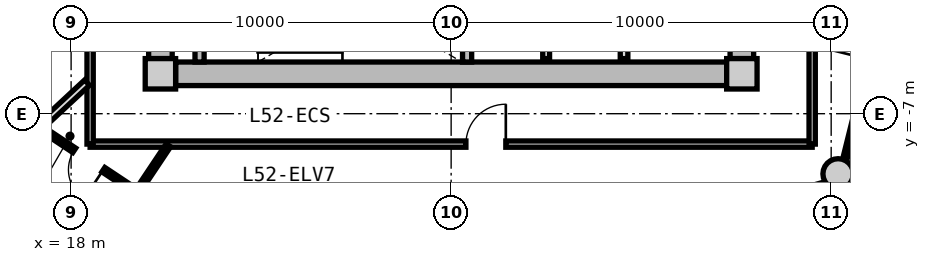
"""IFC4 building model, lengths in metres.
Left out: names, types, materials, properties, quantities, classifications, styles, units other than length and angle.
Written with IfcOpenShell. Run it as: python <this file> out.ifc"""

import sys

from ifc_helpers import new_model, si_unit, direction, frame, frame_2d, origin, origin_2d, place, context, subcontext, project, spatial, rectangle, circle, extrude, source, transform, mapped, element, fill, save


model = new_model("IFC4")
c1 = context("Model", 3, precision=1e-05, world=origin(), true_north=direction((0.0, 1.0)))
c2 = subcontext(c1, "Body", "Model", "MODEL_VIEW")
j1 = project(units=[si_unit("LENGTHUNIT", "METRE"), si_unit("PLANEANGLEUNIT", "RADIAN")], contexts=[c1])
p1 = place(None, origin())
s1 = spatial("IfcSite", under=j1, at=p1, CompositionType="ELEMENT")
p2 = place(p1, origin())
s2 = spatial("IfcBuilding", under=s1, at=p2, CompositionType="ELEMENT")
p3 = place(p2, frame((0.0, 0.0, 167.85)))
s3 = spatial("IfcBuildingStorey", under=s2, at=p3, CompositionType="ELEMENT", Elevation=167.85)
m1 = source(origin(), c2, "Body", "SweptSolid", [
    extrude(rectangle(XDim=0.8, YDim=0.8, at=origin_2d()), origin(), (0.0, 0.0, 1.0), 3.05),
])
for number, where, z_axis, x_axis in (
    (1, (20.35, -5.95, 0.0), (0.0, 0.0, 1.0), (1.0, 0.0, 0.0)),
    (2, (35.65, -5.95, 0.0), (0.0, 0.0, 1.0), (1.0, 0.0, 0.0)),
):
    element("IfcColumn", number, at=place(p3, frame(where, z_axis=z_axis, x_axis=x_axis)), inside=s3, PredefinedType="COLUMN", context=c2, shape_type="MappedRepresentation", body=[
        mapped(m1, transform((0.0, 0.0, 0.0), x_axis=(1.0, 0.0, 0.0), y_axis=(0.0, 1.0, 0.0), z_axis=(0.0, 0.0, 1.0), scale=1.0)),
    ])
m2 = source(origin(), c2, "Body", "SweptSolid", [
    extrude(rectangle(XDim=14.5, YDim=0.62, at=frame_2d((7.25, 0.0))), origin(), (0.0, 0.0, 1.0), 2.81),
])
p4 = place(p3, frame((35.25, -5.95, 0.0), z_axis=(0.0, 0.0, 1.0), x_axis=(-1.0, 0.0, 0.0)))
e3 = element("IfcWall", 3, at=p4, inside=s3, PredefinedType="SHEAR", context=c2, shape_type="MappedRepresentation", body=[
    mapped(m2, transform((0.0, 0.0, 0.0), x_axis=(1.0, 0.0, 0.0), y_axis=(0.0, 1.0, 0.0), z_axis=(0.0, 0.0, 1.0), scale=1.0)),
])
m3 = source(origin(), c2, "Body", "SweptSolid", [
    extrude(rectangle(XDim=11.1, YDim=0.62, at=frame_2d((5.55, 0.0))), origin(), (0.0, 0.0, 1.0), 2.81),
])
p5 = place(p3, frame((20.35, -5.55, 0.0), z_axis=(0.0, 0.0, 1.0), x_axis=(0.0, 1.0, 0.0)))
e4 = element("IfcWall", 4, at=p5, inside=s3, PredefinedType="SHEAR", context=c2, shape_type="MappedRepresentation", body=[
    mapped(m3, transform((0.0, 0.0, 0.0), x_axis=(1.0, 0.0, 0.0), y_axis=(0.0, 1.0, 0.0), z_axis=(0.0, 0.0, 1.0), scale=1.0)),
])
p6 = place(p5, frame((3.8, 0.0, 0.0)))
e5 = element("IfcOpeningElement", 5, at=p6, cuts=e4, PredefinedType="OPENING", context=c2, shape_type="SweptSolid", body=[
    extrude(rectangle(XDim=1.2, YDim=2.15, at=frame_2d((0.6, 1.075))), frame((0.0, 0.32, 0.0), z_axis=(0.0, -1.0, 0.0), x_axis=(1.0, 0.0, 0.0)), (0.0, 0.0, 1.0), 0.64),
])
p7 = place(p3, frame((35.65, 5.55, 0.0), z_axis=(0.0, 0.0, 1.0), x_axis=(0.0, -1.0, 0.0)))
e6 = element("IfcWall", 6, at=p7, inside=s3, PredefinedType="SHEAR", context=c2, shape_type="MappedRepresentation", body=[
    mapped(m3, transform((0.0, 0.0, 0.0), x_axis=(1.0, 0.0, 0.0), y_axis=(0.0, 1.0, 0.0), z_axis=(0.0, 0.0, 1.0), scale=1.0)),
])
p8 = place(p7, frame((5.65, 0.0, 0.0)))
e7 = element("IfcOpeningElement", 7, at=p8, cuts=e6, PredefinedType="OPENING", context=c2, shape_type="SweptSolid", body=[
    extrude(rectangle(XDim=1.2, YDim=2.15, at=frame_2d((0.6, 1.075))), frame((0.0, 0.32, 0.0), z_axis=(0.0, -1.0, 0.0), x_axis=(1.0, 0.0, 0.0)), (0.0, 0.0, 1.0), 0.64),
])
p9 = place(p7, frame((9.3, 0.0, 0.0)))
e8 = element("IfcOpeningElement", 8, at=p9, cuts=e6, PredefinedType="OPENING", context=c2, shape_type="SweptSolid", body=[
    extrude(rectangle(XDim=1.0, YDim=2.1, at=frame_2d((0.5, 1.05))), frame((0.0, 0.32, 0.0), z_axis=(0.0, -1.0, 0.0), x_axis=(1.0, 0.0, 0.0)), (0.0, 0.0, 1.0), 0.64),
])
m4 = source(origin(), c2, "Body", "SweptSolid", [
    extrude(circle(Radius=0.4, at=origin_2d()), origin(), (0.0, 0.0, 1.0), 3.05),
])
p10 = place(p3, frame((38.183, -8.584, 0.0), z_axis=(0.0, 0.0, 1.0), x_axis=(1.0, 0.0, 0.0)))
e9 = element("IfcColumn", 9, at=p10, inside=s3, PredefinedType="COLUMN", context=c2, shape_type="MappedRepresentation", body=[
    mapped(m4, transform((0.0, 0.0, 0.0), x_axis=(1.0, 0.0, 0.0), y_axis=(0.0, 1.0, 0.0), z_axis=(0.0, 0.0, 1.0), scale=1.0)),
])
m5 = source(origin(), c2, "Body", "SweptSolid", [
    extrude(rectangle(XDim=3.19, YDim=0.24, at=frame_2d((1.595, 0.0))), origin(), (0.0, 0.0, 1.0), 2.81),
])
for number, where, z_axis, x_axis in (
    (10, (21.38, -5.64, 0.0), (0.0, 0.0, 1.0), (0.0, 1.0, 0.0)),
    (11, (28.42, -5.64, 0.0), (0.0, 0.0, 1.0), (0.0, 1.0, 0.0)),
):
    element("IfcWall", number, at=place(p3, frame(where, z_axis=z_axis, x_axis=x_axis)), inside=s3, PredefinedType="PARTITIONING", context=c2, shape_type="MappedRepresentation", body=[
        mapped(m5, transform((0.0, 0.0, 0.0), x_axis=(1.0, 0.0, 0.0), y_axis=(0.0, 1.0, 0.0), z_axis=(0.0, 0.0, 1.0), scale=1.0)),
    ])
m6 = source(origin(), c2, "Body", "SweptSolid", [
    extrude(rectangle(XDim=3.8, YDim=0.2, at=frame_2d((1.9, 0.0))), origin(), (0.0, 0.0, 1.0), 2.795),
])
p11 = place(p3, frame((32.55, -5.55, 0.0), z_axis=(0.0, 0.0, 1.0), x_axis=(0.0, 1.0, 0.0)))
e12 = element("IfcWall", 12, at=p11, inside=s3, PredefinedType="PARTITIONING", context=c2, shape_type="MappedRepresentation", body=[
    mapped(m6, transform((0.0, 0.0, 0.0), x_axis=(1.0, 0.0, 0.0), y_axis=(0.0, 1.0, 0.0), z_axis=(0.0, 0.0, 1.0), scale=1.0)),
])
m7 = source(origin(), c2, "Body", "SweptSolid", [
    extrude(rectangle(XDim=4.2, YDim=0.18, at=frame_2d((2.1, 0.0))), origin(), (0.0, 0.0, 1.0), 2.795),
])
p12 = place(p3, frame((30.5, -5.55, 0.0), z_axis=(0.0, 0.0, 1.0), x_axis=(0.0, 1.0, 0.0)))
e13 = element("IfcWall", 13, at=p12, inside=s3, PredefinedType="PARTITIONING", context=c2, shape_type="MappedRepresentation", body=[
    mapped(m7, transform((0.0, 0.0, 0.0), x_axis=(1.0, 0.0, 0.0), y_axis=(0.0, 1.0, 0.0), z_axis=(0.0, 0.0, 1.0), scale=1.0)),
])
m8 = source(origin(), c2, "Body", "SweptSolid", [
    extrude(rectangle(XDim=19.0, YDim=0.165, at=frame_2d((9.5, 0.0))), origin(), (0.0, 0.0, 1.0), 2.795),
])
p13 = place(p3, frame((37.5, -7.8, 0.0), z_axis=(0.0, 0.0, 1.0), x_axis=(-1.0, 0.0, 0.0)))
e14 = element("IfcWall", 14, at=p13, inside=s3, PredefinedType="PARTITIONING", context=c2, shape_type="MappedRepresentation", body=[
    mapped(m8, transform((0.0, 0.0, 0.0), x_axis=(1.0, 0.0, 0.0), y_axis=(0.0, 1.0, 0.0), z_axis=(0.0, 0.0, 1.0), scale=1.0)),
])
p14 = place(p13, frame((8.061, 0.0, 0.0)))
e15 = element("IfcOpeningElement", 15, at=p14, cuts=e14, PredefinedType="OPENING", context=c2, shape_type="SweptSolid", body=[
    extrude(rectangle(XDim=1.05, YDim=2.15, at=frame_2d((0.525, 1.075))), frame((0.0, 0.093, 0.0), z_axis=(0.0, -1.0, 0.0), x_axis=(1.0, 0.0, 0.0)), (0.0, 0.0, 1.0), 0.185),
])
m9 = source(origin(), c2, "Body", "SweptSolid", [
    extrude(rectangle(XDim=7.365, YDim=0.165, at=frame_2d((3.682, 0.0))), origin(), (0.0, 0.0, 1.0), 2.795),
])
p15 = place(p3, frame((18.5, -7.8, 0.0), z_axis=(0.0, 0.0, 1.0), x_axis=(0.0, 1.0, 0.0)))
e16 = element("IfcWall", 16, at=p15, inside=s3, PredefinedType="PARTITIONING", context=c2, shape_type="MappedRepresentation", body=[
    mapped(m9, transform((0.0, 0.0, 0.0), x_axis=(1.0, 0.0, 0.0), y_axis=(0.0, 1.0, 0.0), z_axis=(0.0, 0.0, 1.0), scale=1.0)),
])
p16 = place(p15, frame((2.854, 0.0, 0.0)))
e17 = element("IfcOpeningElement", 17, at=p16, cuts=e16, PredefinedType="OPENING", context=c2, shape_type="SweptSolid", body=[
    extrude(rectangle(XDim=1.05, YDim=2.15, at=frame_2d((0.525, 1.075))), frame((0.0, 0.093, 0.0), z_axis=(0.0, -1.0, 0.0), x_axis=(1.0, 0.0, 0.0)), (0.0, 0.0, 1.0), 0.185),
])
m10 = source(origin(), c2, "Body", "SweptSolid", [
    extrude(rectangle(XDim=6.88, YDim=0.165, at=frame_2d((3.44, 0.0))), origin(), (0.0, 0.0, 1.0), 2.795),
])
p17 = place(p3, frame((37.5, -0.92, 0.0), z_axis=(0.0, 0.0, 1.0), x_axis=(0.0, -1.0, 0.0)))
e18 = element("IfcWall", 18, at=p17, inside=s3, PredefinedType="PARTITIONING", context=c2, shape_type="MappedRepresentation", body=[
    mapped(m10, transform((0.0, 0.0, 0.0), x_axis=(1.0, 0.0, 0.0), y_axis=(0.0, 1.0, 0.0), z_axis=(0.0, 0.0, 1.0), scale=1.0)),
])
m11 = source(origin(), c2, "Body", "SweptSolid", [
    extrude(rectangle(XDim=4.927, YDim=0.19, at=frame_2d((2.463, 0.0))), origin(), (0.0, 0.0, 1.0), 2.345),
])
p18 = place(p3, frame((18.42, -6.183, 0.0), z_axis=(0.0, 0.0, 1.0), x_axis=(-0.732191335987, -0.681098999783, 0.0)))
e19 = element("IfcWall", 19, at=p18, inside=s3, PredefinedType="PARTITIONING", context=c2, shape_type="MappedRepresentation", body=[
    mapped(m11, transform((0.0, 0.0, 0.0), x_axis=(1.0, 0.0, 0.0), y_axis=(0.0, 1.0, 0.0), z_axis=(0.0, 0.0, 1.0), scale=1.0)),
])
m12 = source(origin(), c2, "Body", "SweptSolid", [
    extrude(rectangle(XDim=7.911, YDim=0.115, at=frame_2d((3.955, 0.0))), origin(), (0.0, 0.0, 1.0), 2.345),
])
p19 = place(p3, frame((30.613, -10.927, 0.0), z_axis=(0.0, 0.0, 1.0), x_axis=(0.961104741235, 0.276184134908, 0.0)))
e20 = element("IfcWall", 20, at=p19, inside=s3, PredefinedType="PARTITIONING", context=c2, shape_type="MappedRepresentation", body=[
    mapped(m12, transform((0.0, 0.0, 0.0), x_axis=(1.0, 0.0, 0.0), y_axis=(0.0, 1.0, 0.0), z_axis=(0.0, 0.0, 1.0), scale=1.0)),
])
p20 = place(p19, frame((3.48, 0.0, 0.0)))
e21 = element("IfcOpeningElement", 21, at=p20, cuts=e20, PredefinedType="OPENING", context=c2, shape_type="SweptSolid", body=[
    extrude(rectangle(XDim=0.95, YDim=2.1, at=frame_2d((0.475, 1.05))), frame((0.0, 0.067, 0.0), z_axis=(0.0, -1.0, 0.0), x_axis=(1.0, 0.0, 0.0)), (0.0, 0.0, 1.0), 0.135),
])
m13 = source(origin(), c2, "Body", "SweptSolid", [
    extrude(rectangle(XDim=7.492, YDim=0.115, at=frame_2d((3.746, 0.0))), origin(), (0.0, 0.0, 1.0), 2.345),
])
p21 = place(p3, frame((38.223, -8.749, 0.0), z_axis=(0.0, 0.0, 1.0), x_axis=(0.24104782819, 0.970513237686, 0.0)))
e22 = element("IfcWall", 22, at=p21, inside=s3, PredefinedType="PARTITIONING", context=c2, shape_type="MappedRepresentation", body=[
    mapped(m13, transform((0.0, 0.0, 0.0), x_axis=(1.0, 0.0, 0.0), y_axis=(0.0, 1.0, 0.0), z_axis=(0.0, 0.0, 1.0), scale=1.0)),
])
p22 = place(p21, frame((3.271, 0.0, 0.0)))
e23 = element("IfcOpeningElement", 23, at=p22, cuts=e22, PredefinedType="OPENING", context=c2, shape_type="SweptSolid", body=[
    extrude(rectangle(XDim=0.95, YDim=2.1, at=frame_2d((0.475, 1.05))), frame((0.0, 0.067, 0.0), z_axis=(0.0, -1.0, 0.0), x_axis=(1.0, 0.0, 0.0)), (0.0, 0.0, 1.0), 0.135),
])
m14 = source(origin(), c2, "Body", "SweptSolid", [
    extrude(rectangle(XDim=1.208, YDim=0.115, at=frame_2d((0.604, 0.0))), origin(), (0.0, 0.0, 1.0), 2.795),
])
p23 = place(p3, frame((38.223, -8.749, 0.0), z_axis=(0.0, 0.0, 1.0), x_axis=(0.75668207681, -0.653783018008, 0.0)))
e24 = element("IfcWall", 24, at=p23, inside=s3, PredefinedType="PARTITIONING", context=c2, shape_type="MappedRepresentation", body=[
    mapped(m14, transform((0.0, 0.0, 0.0), x_axis=(1.0, 0.0, 0.0), y_axis=(0.0, 1.0, 0.0), z_axis=(0.0, 0.0, 1.0), scale=1.0)),
])
m15 = source(origin(), c2, "Body", "SweptSolid", [
    extrude(rectangle(XDim=1.482, YDim=0.14, at=frame_2d((0.741, 0.0))), origin(), (0.0, 0.0, 1.0), 2.795),
])
p24 = place(p3, frame((20.56, -7.83, 0.0), z_axis=(0.0, 0.0, 1.0), x_axis=(-0.555308105158, -0.831644700786, 0.0)))
e25 = element("IfcWall", 25, at=p24, inside=s3, PredefinedType="PARTITIONING", context=c2, shape_type="MappedRepresentation", body=[
    mapped(m15, transform((0.0, 0.0, 0.0), x_axis=(1.0, 0.0, 0.0), y_axis=(0.0, 1.0, 0.0), z_axis=(0.0, 0.0, 1.0), scale=1.0)),
])
m16 = source(origin(), c2, "Body", "SweptSolid", [
    extrude(rectangle(XDim=3.051, YDim=0.14, at=frame_2d((1.525, 0.0))), origin(), (0.0, 0.0, 1.0), 2.795),
])
p25 = place(p3, frame((19.737, -9.063, 0.0), z_axis=(0.0, 0.0, 1.0), x_axis=(-0.832763694299, 0.553628602456, 0.0)))
e26 = element("IfcWall", 26, at=p25, inside=s3, PredefinedType="PARTITIONING", context=c2, shape_type="MappedRepresentation", body=[
    mapped(m16, transform((0.0, 0.0, 0.0), x_axis=(1.0, 0.0, 0.0), y_axis=(0.0, 1.0, 0.0), z_axis=(0.0, 0.0, 1.0), scale=1.0)),
])
p26 = place(p25, frame((1.065, 0.0, 0.0)))
e27 = element("IfcOpeningElement", 27, at=p26, cuts=e26, PredefinedType="OPENING", context=c2, shape_type="SweptSolid", body=[
    extrude(rectangle(XDim=0.92, YDim=2.1, at=frame_2d((0.46, 1.05))), frame((0.0, 0.08, 0.0), z_axis=(0.0, -1.0, 0.0), x_axis=(1.0, 0.0, 0.0)), (0.0, 0.0, 1.0), 0.16),
])
m17 = source(origin(), c2, "Body", "SweptSolid", [
    extrude(rectangle(XDim=1.05, YDim=2.15, at=frame_2d((0.525, 1.075))), frame((0.0, 0.025, 0.0), z_axis=(0.0, -1.0, 0.0), x_axis=(1.0, 0.0, 0.0)), (0.0, 0.0, 1.0), 0.05),
])
p27 = place(p14, frame((1.05, 0.0, 0.0), z_axis=(0.0, 0.0, 1.0), x_axis=(-1.0, 0.0, 0.0)))
e28 = element("IfcDoor", 28, at=p27, inside=s3, OperationType="SINGLE_SWING_RIGHT", PredefinedType="DOOR", context=c2, shape_type="MappedRepresentation", body=[
    mapped(m17, transform((0.0, 0.0, 0.0), x_axis=(1.0, 0.0, 0.0), y_axis=(0.0, 1.0, 0.0), z_axis=(0.0, 0.0, 1.0), scale=1.0)),
])
fill(e15, e28)
m18 = source(origin(), c2, "Body", "SweptSolid", [
    extrude(rectangle(XDim=0.92, YDim=2.1, at=frame_2d((0.46, 1.05))), frame((0.0, 0.025, 0.0), z_axis=(0.0, -1.0, 0.0), x_axis=(1.0, 0.0, 0.0)), (0.0, 0.0, 1.0), 0.05),
])
p28 = place(p26, origin())
e29 = element("IfcDoor", 29, at=p28, inside=s3, OperationType="SINGLE_SWING_LEFT", PredefinedType="DOOR", context=c2, shape_type="MappedRepresentation", body=[
    mapped(m18, transform((0.0, 0.0, 0.0), x_axis=(1.0, 0.0, 0.0), y_axis=(0.0, 1.0, 0.0), z_axis=(0.0, 0.0, 1.0), scale=1.0)),
])
fill(e27, e29)
save(model, sys.argv[1])
